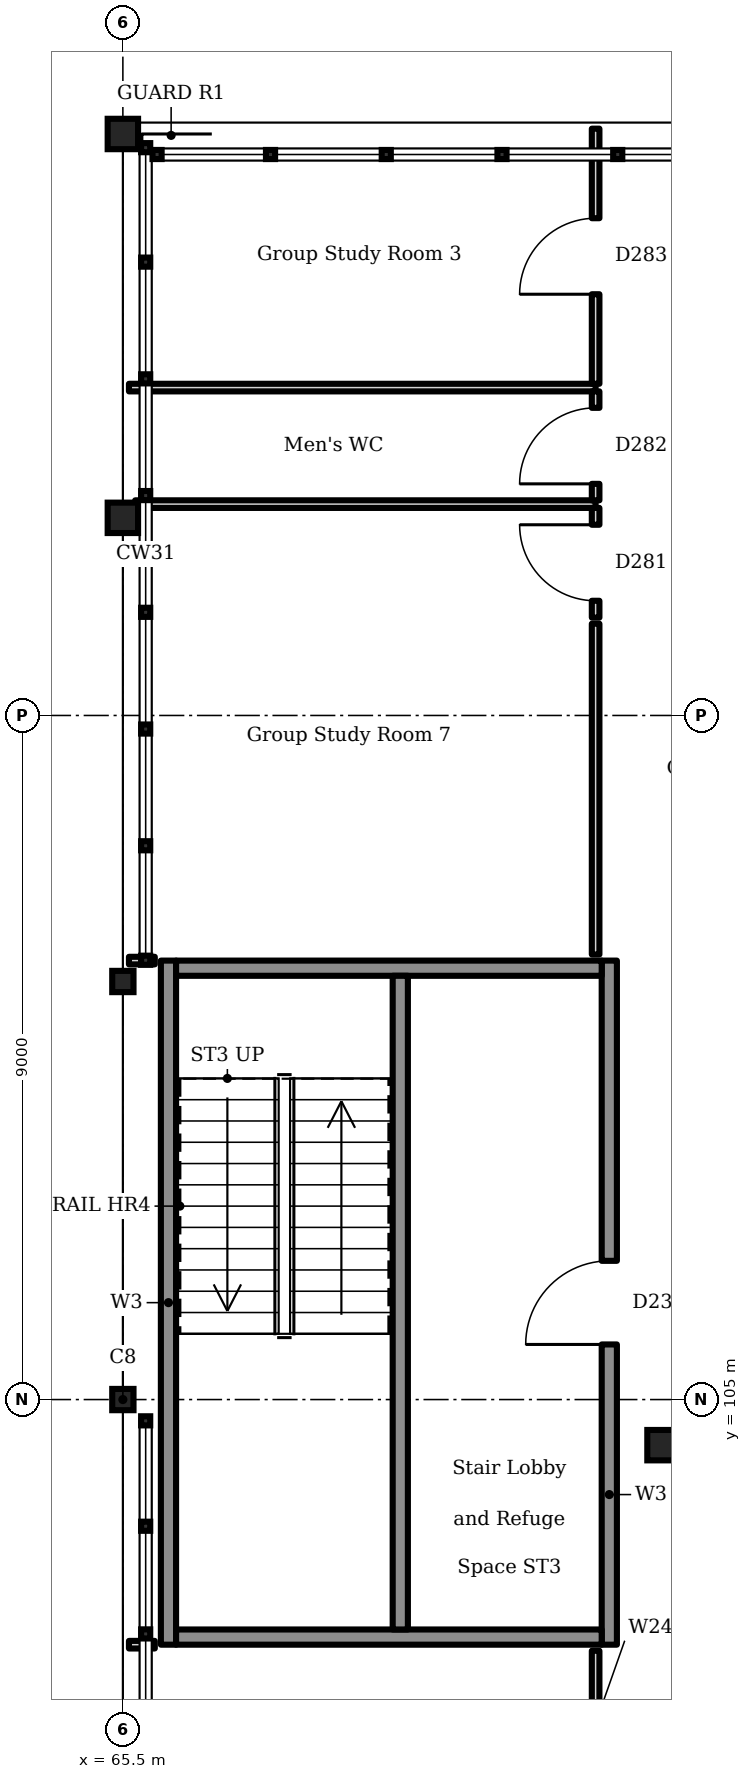
"""IFC4 building model, lengths in metres.
Left out: names, types, materials, properties, quantities, classifications, styles, units other than length and angle.
Written with IfcOpenShell. Run it as: python <this file> out.ifc"""

import sys

from ifc_helpers import new_model, si_unit, direction, frame, frame_2d, origin, origin_2d, place, context, subcontext, project, spatial, rectangle, hollow_circle, i_section, extrude, element, fill, save


model = new_model("IFC4")
c1 = context("Model", 3, precision=1e-05, world=origin(), true_north=direction((0.0, 1.0)))
c2 = subcontext(c1, "Body", "Model", "MODEL_VIEW")
j1 = project(units=[si_unit("LENGTHUNIT", "METRE"), si_unit("PLANEANGLEUNIT", "RADIAN")], contexts=[c1])
p1 = place(None, origin())
s1 = spatial("IfcSite", under=j1, at=p1, CompositionType="ELEMENT")
p2 = place(p1, origin())
s2 = spatial("IfcBuilding", under=s1, at=p2, CompositionType="ELEMENT")
p3 = place(p2, frame((0.0, 0.0, 18.9)))
s3 = spatial("IfcBuildingStorey", under=s2, at=p3, CompositionType="ELEMENT", Elevation=18.9)
for number, where, z_axis, x_axis in (
    (1, (65.5, 105.0, 0.0), (0.0, 0.0, 1.0), (1.0, 0.0, 0.0)),
    (2, (65.5, 110.5, 0.0), (0.0, 0.0, 1.0), (1.0, 0.0, 0.0)),
):
    element("IfcColumn", number, at=place(p3, frame(where, z_axis=z_axis, x_axis=x_axis)), inside=s3, PredefinedType="COLUMN", context=c2, shape_type="SweptSolid", body=[
        extrude(i_section(OverallWidth=0.28, OverallDepth=0.28, WebThickness=0.01, FlangeThickness=0.018, FilletRadius=0.024, at=origin_2d()), origin(), (0.0, 0.0, 1.0), 4.5),
    ])
p4 = place(p3, frame((72.6, 104.4, 0.0), z_axis=(0.0, 0.0, 1.0), x_axis=(1.0, 0.0, 0.0)))
e3 = element("IfcColumn", 3, at=p4, inside=s3, PredefinedType="COLUMN", context=c2, shape_type="SweptSolid", body=[
    extrude(hollow_circle(Radius=0.203, WallThickness=0.012, at=origin_2d()), origin(), (0.0, 0.0, 1.0), 4.5),
])
for number, where, z_axis, x_axis in (
    (4, (65.5, 121.65, 0.0), (0.0, 0.0, 1.0), (1.0, 0.0, 0.0)),
    (5, (65.5, 116.6, 0.0), (0.0, 0.0, 1.0), (1.0, 0.0, 0.0)),
):
    element("IfcColumn", number, at=place(p3, frame(where, z_axis=z_axis, x_axis=x_axis)), inside=s3, PredefinedType="COLUMN", context=c2, shape_type="SweptSolid", body=[
        extrude(hollow_circle(Radius=0.162, WallThickness=0.012, at=origin_2d()), origin(), (0.0, 0.0, 1.0), 4.5),
    ])
p5 = place(p3, frame((66.1, 101.775, 0.0), z_axis=(0.0, 0.0, 1.0), x_axis=(0.0, 1.0, 0.0)))
e6 = element("IfcWall", 6, at=p5, inside=s3, PredefinedType="SOLIDWALL", context=c2, shape_type="SweptSolid", body=[
    extrude(rectangle(XDim=9.0, YDim=0.2, at=frame_2d((4.5, 0.0))), origin(), (0.0, 0.0, 1.0), 4.35),
])
p6 = place(p3, frame((71.9, 101.775, 0.0), z_axis=(0.0, 0.0, 1.0), x_axis=(0.0, 1.0, 0.0)))
e7 = element("IfcWall", 7, at=p6, inside=s3, PredefinedType="SOLIDWALL", context=c2, shape_type="SweptSolid", body=[
    extrude(rectangle(XDim=9.0, YDim=0.2, at=frame_2d((4.5, 0.0))), origin(), (0.0, 0.0, 1.0), 4.35),
])
p7 = place(p6, frame((3.95, 0.0, 0.0)))
e8 = element("IfcOpeningElement", 8, at=p7, cuts=e7, PredefinedType="OPENING", context=c2, shape_type="SweptSolid", body=[
    extrude(rectangle(XDim=1.1, YDim=2.1, at=frame_2d((0.55, 1.05))), frame((0.0, 0.11, 0.0), z_axis=(0.0, -1.0, 0.0), x_axis=(1.0, 0.0, 0.0)), (0.0, 0.0, 1.0), 0.22),
])
for number, where, z_axis, x_axis in (
    (9, (66.2, 101.875, 0.0), (0.0, 0.0, 1.0), (1.0, 0.0, 0.0)),
    (10, (66.2, 110.675, 0.0), (0.0, 0.0, 1.0), (1.0, 0.0, 0.0)),
):
    element("IfcWall", number, at=place(p3, frame(where, z_axis=z_axis, x_axis=x_axis)), inside=s3, PredefinedType="SOLIDWALL", context=c2, shape_type="SweptSolid", body=[
        extrude(rectangle(XDim=5.6, YDim=0.2, at=frame_2d((2.8, 0.0))), origin(), (0.0, 0.0, 1.0), 4.35),
    ])
p8 = place(p3, frame((69.15, 101.975, 0.0), z_axis=(0.0, 0.0, 1.0), x_axis=(0.0, 1.0, 0.0)))
e11 = element("IfcWall", 11, at=p8, inside=s3, PredefinedType="SOLIDWALL", context=c2, shape_type="SweptSolid", body=[
    extrude(rectangle(XDim=8.6, YDim=0.2, at=frame_2d((4.3, 0.0))), origin(), (0.0, 0.0, 1.0), 4.35),
])
p9 = place(p3, frame((65.58, 101.775, 0.0), z_axis=(0.0, 0.0, 1.0), x_axis=(1.0, 0.0, 0.0)))
e12 = element("IfcWall", 12, at=p9, inside=s3, PredefinedType="PARTITIONING", context=c2, shape_type="SweptSolid", body=[
    extrude(rectangle(XDim=0.34, YDim=0.1, at=frame_2d((0.17, 0.0))), origin(), (0.0, 0.0, 1.0), 3.91),
])
p10 = place(p3, frame((71.72, 101.695, 0.0), z_axis=(0.0, 0.0, 1.0), x_axis=(0.0, -1.0, 0.0)))
e13 = element("IfcWall", 13, at=p10, inside=s3, PredefinedType="PARTITIONING", context=c2, shape_type="SweptSolid", body=[
    extrude(rectangle(XDim=5.615, YDim=0.1, at=frame_2d((2.808, 0.0))), origin(), (0.0, 0.0, 1.0), 4.35),
])
p11 = place(p10, frame((1.907, 0.0, 0.0)))
e14 = element("IfcOpeningElement", 14, at=p11, cuts=e13, PredefinedType="OPENING", context=c2, shape_type="SweptSolid", body=[
    extrude(rectangle(XDim=1.8, YDim=2.1, at=frame_2d((0.9, 1.05))), frame((0.0, 0.06, 0.0), z_axis=(0.0, -1.0, 0.0), x_axis=(1.0, 0.0, 0.0)), (0.0, 0.0, 1.0), 0.12),
])
p12 = place(p3, frame((65.662, 116.781, 0.0), z_axis=(0.0, 0.0, 1.0), x_axis=(1.0, 0.0, 0.0)))
e15 = element("IfcWall", 15, at=p12, inside=s3, PredefinedType="PARTITIONING", context=c2, shape_type="SweptSolid", body=[
    extrude(rectangle(XDim=6.058, YDim=0.1, at=frame_2d((3.029, 0.0))), origin(), (0.0, 0.0, 1.0), 3.85),
])
p13 = place(p3, frame((71.72, 116.73, 0.0), z_axis=(0.0, 0.0, 1.0), x_axis=(0.0, -1.0, 0.0)))
e16 = element("IfcWall", 16, at=p13, inside=s3, PredefinedType="PARTITIONING", context=c2, shape_type="SweptSolid", body=[
    extrude(rectangle(XDim=1.443, YDim=0.1, at=frame_2d((0.722, 0.0))), origin(), (0.0, 0.0, 1.0), 4.35),
])
p14 = place(p13, frame((0.222, 0.0, 0.0)))
e17 = element("IfcOpeningElement", 17, at=p14, cuts=e16, PredefinedType="OPENING", context=c2, shape_type="SweptSolid", body=[
    extrude(rectangle(XDim=1.0, YDim=2.1, at=frame_2d((0.5, 1.05))), frame((0.0, 0.06, 0.0), z_axis=(0.0, -1.0, 0.0), x_axis=(1.0, 0.0, 0.0)), (0.0, 0.0, 1.0), 0.12),
])
p15 = place(p3, frame((71.72, 115.207, 0.0), z_axis=(0.0, 0.0, 1.0), x_axis=(0.0, -1.0, 0.0)))
e18 = element("IfcWall", 18, at=p15, inside=s3, PredefinedType="PARTITIONING", context=c2, shape_type="SweptSolid", body=[
    extrude(rectangle(XDim=4.352, YDim=0.1, at=frame_2d((2.176, 0.0))), origin(), (0.0, 0.0, 1.0), 4.35),
])
p16 = place(p3, frame((65.92, 110.775, 0.0), z_axis=(0.0, 0.0, 1.0), x_axis=(-1.0, 0.0, 0.0)))
e19 = element("IfcWall", 19, at=p16, inside=s3, PredefinedType="PARTITIONING", context=c2, shape_type="SweptSolid", body=[
    extrude(rectangle(XDim=0.34, YDim=0.1, at=frame_2d((0.17, 0.0))), origin(), (0.0, 0.0, 1.0), 4.04),
])
p17 = place(p3, frame((65.58, 118.314, 0.0), z_axis=(0.0, 0.0, 1.0), x_axis=(1.0, 0.0, 0.0)))
e20 = element("IfcWall", 20, at=p17, inside=s3, PredefinedType="PARTITIONING", context=c2, shape_type="SweptSolid", body=[
    extrude(rectangle(XDim=6.14, YDim=0.1, at=frame_2d((3.07, 0.0))), origin(), (0.0, 0.0, 1.0), 3.85),
])
p18 = place(p3, frame((71.72, 118.264, 0.0), z_axis=(0.0, 0.0, 1.0), x_axis=(0.0, -1.0, 0.0)))
e21 = element("IfcWall", 21, at=p18, inside=s3, PredefinedType="PARTITIONING", context=c2, shape_type="SweptSolid", body=[
    extrude(rectangle(XDim=1.433, YDim=0.1, at=frame_2d((0.717, 0.0))), origin(), (0.0, 0.0, 1.0), 4.35),
])
p19 = place(p18, frame((0.217, 0.0, 0.0)))
e22 = element("IfcOpeningElement", 22, at=p19, cuts=e21, PredefinedType="OPENING", context=c2, shape_type="SweptSolid", body=[
    extrude(rectangle(XDim=1.0, YDim=2.1, at=frame_2d((0.5, 1.05))), frame((0.0, 0.06, 0.0), z_axis=(0.0, -1.0, 0.0), x_axis=(1.0, 0.0, 0.0)), (0.0, 0.0, 1.0), 0.12),
])
p20 = place(p3, frame((71.72, 121.72, 0.0), z_axis=(0.0, 0.0, 1.0), x_axis=(0.0, -1.0, 0.0)))
e23 = element("IfcWall", 23, at=p20, inside=s3, PredefinedType="PARTITIONING", context=c2, shape_type="SweptSolid", body=[
    extrude(rectangle(XDim=3.356, YDim=0.1, at=frame_2d((1.678, 0.0))), origin(), (0.0, 0.0, 1.0), 3.95),
])
p21 = place(p20, frame((1.178, 0.0, 0.0)))
e24 = element("IfcOpeningElement", 24, at=p21, cuts=e23, PredefinedType="OPENING", context=c2, shape_type="SweptSolid", body=[
    extrude(rectangle(XDim=1.0, YDim=2.1, at=frame_2d((0.5, 1.05))), frame((0.0, 0.06, 0.0), z_axis=(0.0, -1.0, 0.0), x_axis=(1.0, 0.0, 0.0)), (0.0, 0.0, 1.0), 0.12),
])
p22 = place(p7, origin())
e25 = element("IfcDoor", 25, at=p22, inside=s3, OperationType="SINGLE_SWING_RIGHT", PredefinedType="DOOR", context=c2, shape_type="SweptSolid", body=[
    extrude(rectangle(XDim=1.1, YDim=2.1, at=frame_2d((0.55, 1.05))), frame((0.0, 0.025, 0.0), z_axis=(0.0, -1.0, 0.0), x_axis=(1.0, 0.0, 0.0)), (0.0, 0.0, 1.0), 0.05),
])
fill(e8, e25)
p23 = place(p14, frame((1.0, 0.0, 0.0), z_axis=(0.0, 0.0, 1.0), x_axis=(-1.0, 0.0, 0.0)))
e26 = element("IfcDoor", 26, at=p23, inside=s3, OperationType="SINGLE_SWING_LEFT", PredefinedType="DOOR", context=c2, shape_type="SweptSolid", body=[
    extrude(rectangle(XDim=1.0, YDim=2.1, at=frame_2d((0.5, 1.05))), frame((0.0, 0.025, 0.0), z_axis=(0.0, -1.0, 0.0), x_axis=(1.0, 0.0, 0.0)), (0.0, 0.0, 1.0), 0.05),
])
fill(e17, e26)
p24 = place(p19, frame((1.0, 0.0, 0.0), z_axis=(0.0, 0.0, 1.0), x_axis=(-1.0, 0.0, 0.0)))
e27 = element("IfcDoor", 27, at=p24, inside=s3, OperationType="SINGLE_SWING_RIGHT", PredefinedType="DOOR", context=c2, shape_type="SweptSolid", body=[
    extrude(rectangle(XDim=1.0, YDim=2.1, at=frame_2d((0.5, 1.05))), frame((0.0, 0.025, 0.0), z_axis=(0.0, -1.0, 0.0), x_axis=(1.0, 0.0, 0.0)), (0.0, 0.0, 1.0), 0.05),
])
fill(e22, e27)
p25 = place(p21, frame((1.0, 0.0, 0.0), z_axis=(0.0, 0.0, 1.0), x_axis=(-1.0, 0.0, 0.0)))
e28 = element("IfcDoor", 28, at=p25, inside=s3, OperationType="SINGLE_SWING_RIGHT", PredefinedType="DOOR", context=c2, shape_type="SweptSolid", body=[
    extrude(rectangle(XDim=1.0, YDim=2.1, at=frame_2d((0.5, 1.05))), frame((0.0, 0.025, 0.0), z_axis=(0.0, -1.0, 0.0), x_axis=(1.0, 0.0, 0.0)), (0.0, 0.0, 1.0), 0.05),
])
fill(e24, e28)
save(model, sys.argv[1])
